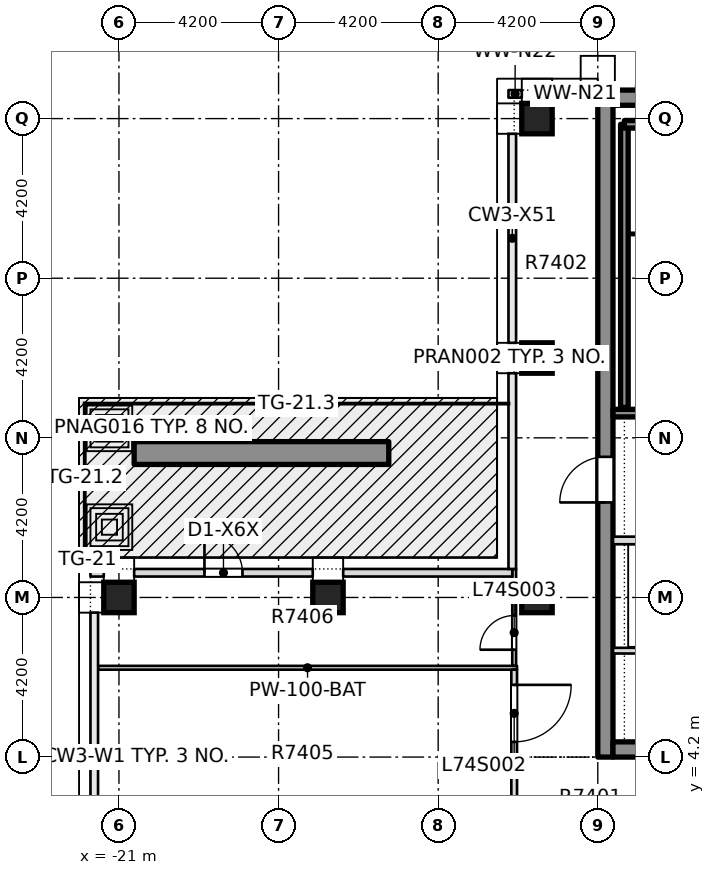
"""IFC4 building model, lengths in metres.
Left out: names, types, materials, properties, quantities, classifications, styles, units other than length and angle.
Written with IfcOpenShell. Run it as: python <this file> out.ifc"""

import sys

from ifc_helpers import new_model, si_unit, direction, frame, frame_2d, origin, origin_2d, place, context, subcontext, project, spatial, rectangle, extrude, element, fill, save


model = new_model("IFC4")
c1 = context("Model", 3, precision=1e-05, world=origin(), true_north=direction((0.0, 1.0)))
c2 = subcontext(c1, "Body", "Model", "MODEL_VIEW")
j1 = project(units=[si_unit("LENGTHUNIT", "METRE"), si_unit("PLANEANGLEUNIT", "RADIAN")], contexts=[c1])
p1 = place(None, origin())
s1 = spatial("IfcSite", under=j1, at=p1, CompositionType="ELEMENT")
p2 = place(p1, origin())
s2 = spatial("IfcBuilding", under=s1, at=p2, CompositionType="ELEMENT")
p3 = place(p2, frame((0.0, 0.0, 284.85)))
s3 = spatial("IfcBuildingStorey", under=s2, at=p3, CompositionType="ELEMENT", Elevation=284.85)
p4 = place(p3, frame((-8.2, 4.2, -0.5), z_axis=(0.0, 0.0, 1.0), x_axis=(0.0, 1.0, 0.0)))
e1 = element("IfcWall", 1, at=p4, inside=s3, PredefinedType="SHEAR", context=c2, shape_type="SweptSolid", body=[
    extrude(rectangle(XDim=17.55, YDim=0.4, at=frame_2d((8.775, 0.0))), origin(), (0.0, 0.0, 1.0), 4.5),
])
p5 = place(p4, frame((6.7, 0.0, 0.5)))
e2 = element("IfcOpeningElement", 2, at=p5, cuts=e1, PredefinedType="OPENING", context=c2, shape_type="SweptSolid", body=[
    extrude(rectangle(XDim=1.2, YDim=2.1, at=frame_2d((0.6, 1.05))), frame((0.0, 0.21, 0.0), z_axis=(0.0, -1.0, 0.0), x_axis=(1.0, 0.0, 0.0)), (0.0, 0.0, 1.0), 0.42),
])
for number, where, z_axis, x_axis in (
    (3, (-8.0, 4.4, -0.5), (0.0, 0.0, 1.0), (1.0, 0.0, 0.0)),
    (4, (-8.0, 21.55, -0.5), (0.0, 0.0, 1.0), (1.0, 0.0, 0.0)),
):
    element("IfcWall", number, at=place(p3, frame(where, z_axis=z_axis, x_axis=x_axis)), inside=s3, PredefinedType="SHEAR", context=c2, shape_type="SweptSolid", body=[
        extrude(rectangle(XDim=16.0, YDim=0.4, at=frame_2d((8.0, 0.0))), origin(), (0.0, 0.0, 1.0), 4.5),
    ])
for number, where, z_axis, x_axis in (
    (5, (-21.0, 8.4, -0.5), (0.0, 0.0, 1.0), (1.0, 0.0, 0.0)),
    (6, (-15.5, 8.4, -0.5), (0.0, 0.0, 1.0), (1.0, 0.0, 0.0)),
    (7, (-10.0, 8.4, -0.5), (0.0, 0.0, 1.0), (1.0, 0.0, 0.0)),
    (8, (-10.0, 14.7, -0.5), (0.0, 0.0, 1.0), (1.0, 0.0, 0.0)),
    (9, (-10.0, 21.0, -0.5), (0.0, 0.0, 1.0), (1.0, 0.0, 0.0)),
):
    element("IfcColumn", number, at=place(p3, frame(where, z_axis=z_axis, x_axis=x_axis)), inside=s3, PredefinedType="COLUMN", context=c2, shape_type="SweptSolid", body=[
        extrude(rectangle(XDim=0.8, YDim=0.8, at=origin_2d()), origin(), (0.0, 0.0, 1.0), 4.5),
    ])
p6 = place(p3, frame((-21.55, 6.55, 0.0), z_axis=(0.0, 0.0, 1.0), x_axis=(1.0, 0.0, 0.0)))
e10 = element("IfcWall", 10, at=p6, inside=s3, PredefinedType="PARTITIONING", context=c2, shape_type="SweptSolid", body=[
    extrude(rectangle(XDim=11.025, YDim=0.1, at=frame_2d((5.513, 0.0))), origin(), (0.0, 0.0, 1.0), 4.0),
])
p7 = place(p3, frame((-10.6, 2.075, 0.0), z_axis=(0.0, 0.0, 1.0), x_axis=(0.0, 1.0, 0.0)))
e11 = element("IfcWall", 11, at=p7, inside=s3, PredefinedType="PARTITIONING", context=c2, shape_type="SweptSolid", body=[
    extrude(rectangle(XDim=4.425, YDim=0.15, at=frame_2d((2.212, 0.0))), origin(), (0.0, 0.0, 1.0), 4.0),
])
p8 = place(p7, frame((2.525, 0.0, 0.0)))
e12 = element("IfcOpeningElement", 12, at=p8, cuts=e11, PredefinedType="OPENING", context=c2, shape_type="SweptSolid", body=[
    extrude(rectangle(XDim=1.5, YDim=2.1, at=frame_2d((0.75, 1.05))), frame((0.0, 0.085, 0.0), z_axis=(0.0, -1.0, 0.0), x_axis=(1.0, 0.0, 0.0)), (0.0, 0.0, 1.0), 0.17),
])
p9 = place(p3, frame((-10.6, 6.6, 0.0), z_axis=(0.0, 0.0, 1.0), x_axis=(0.0, 1.0, 0.0)))
e13 = element("IfcWall", 13, at=p9, inside=s3, PredefinedType="PARTITIONING", context=c2, shape_type="SweptSolid", body=[
    extrude(rectangle(XDim=2.55, YDim=0.1, at=frame_2d((1.275, 0.0))), origin(), (0.0, 0.0, 1.0), 4.0),
])
p10 = place(p9, frame((0.425, 0.0, 0.0)))
e14 = element("IfcOpeningElement", 14, at=p10, cuts=e13, PredefinedType="OPENING", context=c2, shape_type="SweptSolid", body=[
    extrude(rectangle(XDim=0.9, YDim=2.1, at=frame_2d((0.45, 1.05))), frame((0.0, 0.06, 0.0), z_axis=(0.0, -1.0, 0.0), x_axis=(1.0, 0.0, 0.0)), (0.0, 0.0, 1.0), 0.12),
])
p11 = place(p3, frame((-20.6, 12.2, 0.0), z_axis=(0.0, 0.0, 1.0), x_axis=(1.0, 0.0, 0.0)))
e15 = element("IfcWall", 15, at=p11, inside=s3, PredefinedType="USERDEFINED", context=c2, shape_type="SweptSolid", body=[
    extrude(rectangle(XDim=6.7, YDim=0.6, at=frame_2d((3.35, 0.0))), origin(), (0.0, 0.0, 1.0), 1.0),
])
p12 = place(p3, frame((-8.4, 21.65, 0.0), z_axis=(0.0, 0.0, 1.0), x_axis=(-1.0, 0.0, 0.0)))
e16 = element("IfcWall", 16, at=p12, inside=s3, PredefinedType="STANDARD", context=c2, shape_type="SweptSolid", body=[
    extrude(rectangle(XDim=1.2, YDim=0.2, at=frame_2d((0.6, 0.0))), origin(), (0.0, 0.0, 1.0), 4.0),
])
p13 = place(p3, frame((-10.4, 21.65, 0.0), z_axis=(0.0, 0.0, 1.0), x_axis=(-1.0, 0.0, 0.0)))
e17 = element("IfcWall", 17, at=p13, inside=s3, PredefinedType="STANDARD", context=c2, shape_type="SweptSolid", body=[
    extrude(rectangle(XDim=0.35, YDim=0.2, at=frame_2d((0.175, 0.0))), origin(), (0.0, 0.0, 1.0), 4.0),
])
p14 = place(p3, frame((-10.65, 9.05, 0.0), z_axis=(0.0, 0.0, 1.0), x_axis=(-1.0, 0.0, 0.0)))
e18 = element("IfcWall", 18, at=p14, inside=s3, PredefinedType="STANDARD", context=c2, shape_type="SweptSolid", body=[
    extrude(rectangle(XDim=4.45, YDim=0.2, at=frame_2d((2.225, 0.0))), origin(), (0.0, 0.0, 1.0), 4.0),
])
p15 = place(p3, frame((-15.9, 9.05, 0.0), z_axis=(0.0, 0.0, 1.0), x_axis=(-1.0, 0.0, 0.0)))
e19 = element("IfcWall", 19, at=p15, inside=s3, PredefinedType="STANDARD", context=c2, shape_type="SweptSolid", body=[
    extrude(rectangle(XDim=4.7, YDim=0.2, at=frame_2d((2.35, 0.0))), origin(), (0.0, 0.0, 1.0), 4.0),
])
p16 = place(p15, frame((1.85, 0.0, 0.0)))
e20 = element("IfcOpeningElement", 20, at=p16, cuts=e19, PredefinedType="OPENING", context=c2, shape_type="SweptSolid", body=[
    extrude(rectangle(XDim=1.0, YDim=2.4, at=frame_2d((0.5, 1.2))), frame((0.0, 0.11, 0.0), z_axis=(0.0, -1.0, 0.0), x_axis=(1.0, 0.0, 0.0)), (0.0, 0.0, 1.0), 0.22),
])
p17 = place(p3, frame((-21.4, 9.05, 0.0), z_axis=(0.0, 0.0, 1.0), x_axis=(-1.0, 0.0, 0.0)))
e21 = element("IfcWall", 21, at=p17, inside=s3, PredefinedType="STANDARD", context=c2, shape_type="SweptSolid", body=[
    extrude(rectangle(XDim=0.35, YDim=0.2, at=frame_2d((0.175, 0.0))), origin(), (0.0, 0.0, 1.0), 4.0),
])
p18 = place(p3, frame((-7.999, 7.0, 0.0), z_axis=(0.0, 0.0, 1.0), x_axis=(1.0, 0.0, 0.0)))
e22 = element("IfcWall", 22, at=p18, inside=s3, PredefinedType="PARTITIONING", context=c2, shape_type="SweptSolid", body=[
    extrude(rectangle(XDim=15.998, YDim=0.15, at=frame_2d((7.999, 0.0))), origin(), (0.0, 0.0, 1.0), 4.0),
])
p19 = place(p18, frame((7.299, 0.0, 0.0)))
e23 = element("IfcOpeningElement", 23, at=p19, cuts=e22, PredefinedType="OPENING", context=c2, shape_type="SweptSolid", body=[
    extrude(rectangle(XDim=1.4, YDim=2.1, at=frame_2d((0.7, 1.05))), frame((0.0, 0.085, 0.0), z_axis=(0.0, -1.0, 0.0), x_axis=(1.0, 0.0, 0.0)), (0.0, 0.0, 1.0), 0.17),
])
p20 = place(p3, frame((-7.999, 9.9, 0.0), z_axis=(0.0, 0.0, 1.0), x_axis=(1.0, 0.0, 0.0)))
e24 = element("IfcWall", 24, at=p20, inside=s3, PredefinedType="PARTITIONING", context=c2, shape_type="SweptSolid", body=[
    extrude(rectangle(XDim=4.399, YDim=0.2, at=frame_2d((2.199, 0.0))), origin(), (0.0, 0.0, 1.0), 4.0),
])
p21 = place(p20, frame((1.049, 0.0, 0.0)))
e25 = element("IfcOpeningElement", 25, at=p21, cuts=e24, PredefinedType="OPENING", context=c2, shape_type="SweptSolid", body=[
    extrude(rectangle(XDim=1.1, YDim=2.1, at=frame_2d((0.55, 1.05))), frame((0.0, 0.11, 0.0), z_axis=(0.0, -1.0, 0.0), x_axis=(1.0, 0.0, 0.0)), (0.0, 0.0, 1.0), 0.22),
])
p22 = place(p3, frame((-7.999, 13.25, 0.0), z_axis=(0.0, 0.0, 1.0), x_axis=(1.0, 0.0, 0.0)))
e26 = element("IfcWall", 26, at=p22, inside=s3, PredefinedType="SOLIDWALL", context=c2, shape_type="SweptSolid", body=[
    extrude(rectangle(XDim=4.574, YDim=0.2, at=frame_2d((2.287, 0.0))), origin(), (0.0, 0.0, 1.0), 4.0),
])
p23 = place(p22, frame((1.549, 0.0, 0.0)))
e27 = element("IfcOpeningElement", 27, at=p23, cuts=e26, PredefinedType="OPENING", context=c2, shape_type="SweptSolid", body=[
    extrude(rectangle(XDim=1.2, YDim=2.1, at=frame_2d((0.6, 1.05))), frame((0.0, 0.11, 0.0), z_axis=(0.0, -1.0, 0.0), x_axis=(1.0, 0.0, 0.0)), (0.0, 0.0, 1.0), 0.22),
])
p24 = place(p3, frame((-7.7, 13.4, 0.0), z_axis=(0.0, 0.0, 1.0), x_axis=(0.0, 1.0, 0.0)))
e28 = element("IfcWall", 28, at=p24, inside=s3, PredefinedType="SOLIDWALL", context=c2, shape_type="SweptSolid", body=[
    extrude(rectangle(XDim=7.45, YDim=0.2, at=frame_2d((3.725, 0.0))), origin(), (0.0, 0.0, 1.0), 4.0),
])
p25 = place(p3, frame((-7.7, 20.85, 0.0), z_axis=(0.0, 0.0, 1.0), x_axis=(1.0, 0.0, 0.0)))
e29 = element("IfcWall", 29, at=p25, inside=s3, PredefinedType="SOLIDWALL", context=c2, shape_type="SweptSolid", body=[
    extrude(rectangle(XDim=3.55, YDim=0.2, at=frame_2d((1.775, 0.0))), origin(), (0.0, 0.0, 1.0), 4.0),
])
p26 = place(p8, origin())
e30 = element("IfcDoor", 30, at=p26, inside=s3, OperationType="DOUBLE_DOOR_SINGLE_SWING", PredefinedType="DOOR", context=c2, shape_type="SweptSolid", body=[
    extrude(rectangle(XDim=1.5, YDim=2.1, at=frame_2d((0.75, 1.05))), frame((0.0, 0.025, 0.0), z_axis=(0.0, -1.0, 0.0), x_axis=(1.0, 0.0, 0.0)), (0.0, 0.0, 1.0), 0.05),
])
fill(e12, e30)
p27 = place(p10, origin())
e31 = element("IfcDoor", 31, at=p27, inside=s3, OperationType="SINGLE_SWING_LEFT", PredefinedType="DOOR", context=c2, shape_type="SweptSolid", body=[
    extrude(rectangle(XDim=0.9, YDim=2.1, at=frame_2d((0.45, 1.05))), frame((0.0, 0.025, 0.0), z_axis=(0.0, -1.0, 0.0), x_axis=(1.0, 0.0, 0.0)), (0.0, 0.0, 1.0), 0.05),
])
fill(e14, e31)
p28 = place(p16, origin())
e32 = element("IfcDoor", 32, at=p28, inside=s3, OperationType="SINGLE_SWING_LEFT", PredefinedType="DOOR", context=c2, shape_type="SweptSolid", body=[
    extrude(rectangle(XDim=1.0, YDim=2.4, at=frame_2d((0.5, 1.2))), frame((0.0, 0.025, 0.0), z_axis=(0.0, -1.0, 0.0), x_axis=(1.0, 0.0, 0.0)), (0.0, 0.0, 1.0), 0.05),
])
fill(e20, e32)
p29 = place(p5, origin())
e33 = element("IfcDoor", 33, at=p29, inside=s3, OperationType="SINGLE_SWING_LEFT", PredefinedType="DOOR", context=c2, shape_type="SweptSolid", body=[
    extrude(rectangle(XDim=1.2, YDim=2.1, at=frame_2d((0.6, 1.05))), frame((0.0, 0.025, 0.0), z_axis=(0.0, -1.0, 0.0), x_axis=(1.0, 0.0, 0.0)), (0.0, 0.0, 1.0), 0.05),
])
fill(e2, e33)
save(model, sys.argv[1])
